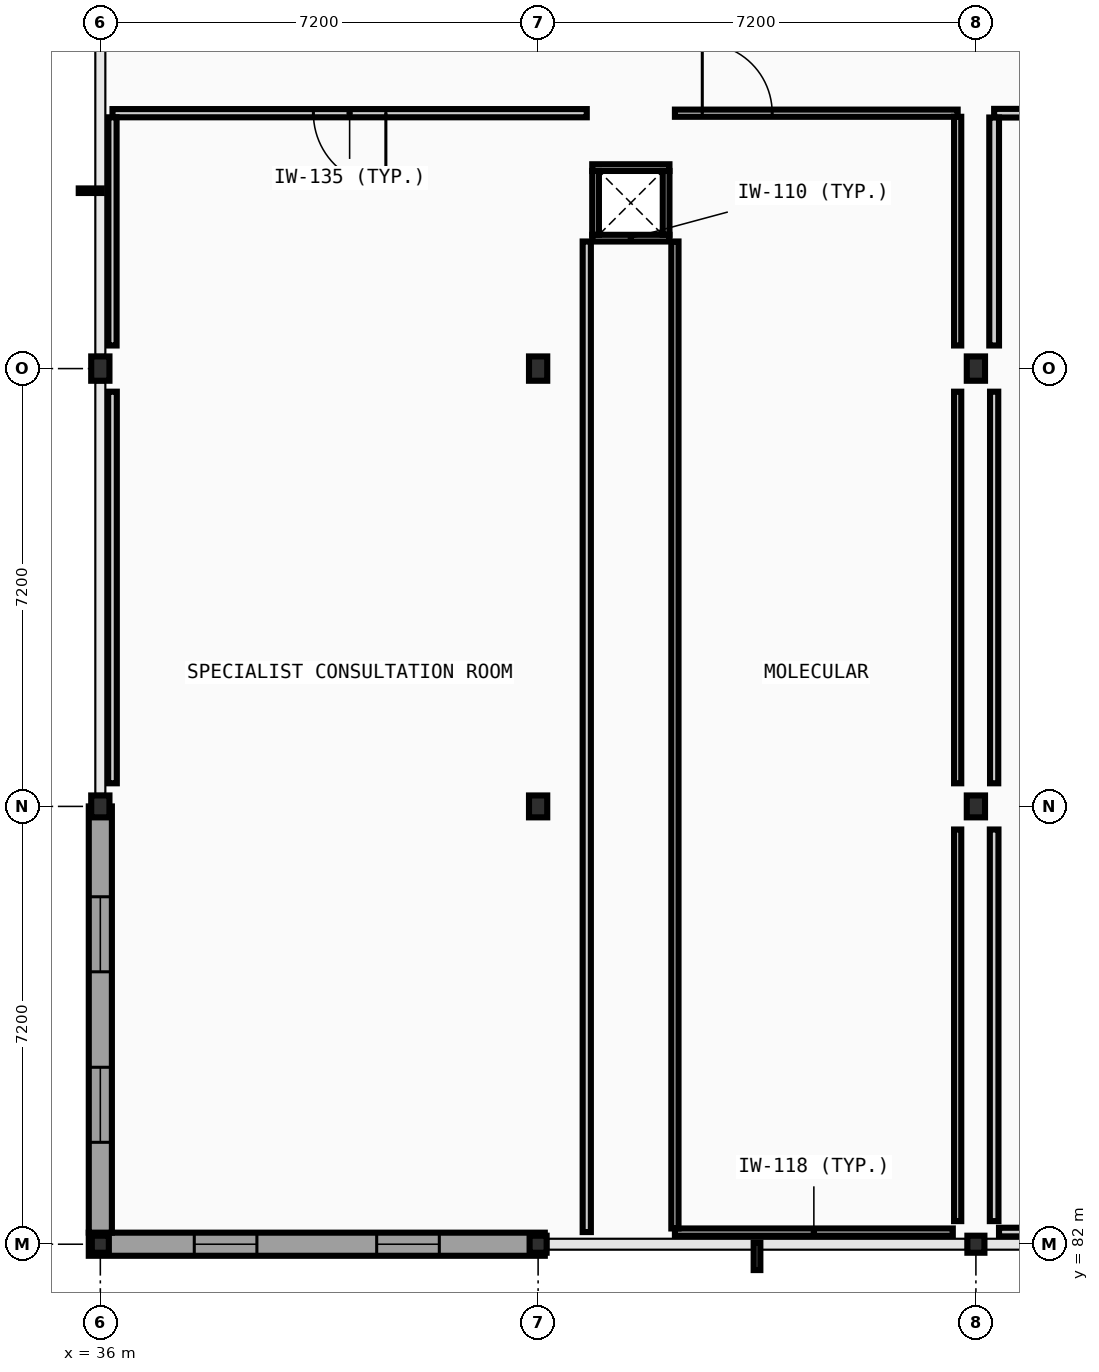
"""IFC4 building model, lengths in metres.
Left out: names, types, materials, properties, quantities, classifications, styles, units other than length and angle.
Written with IfcOpenShell. Run it as: python <this file> out.ifc"""

import sys

from ifc_helpers import new_model, si_unit, direction, frame, frame_2d, origin, origin_2d, place, context, subcontext, project, spatial, rectangle, i_section, extrude, element, fill, save


model = new_model("IFC4")
c1 = context("Model", 3, precision=1e-05, world=origin(), true_north=direction((0.0, 1.0)))
c2 = subcontext(c1, "Body", "Model", "MODEL_VIEW")
j1 = project(units=[si_unit("LENGTHUNIT", "METRE"), si_unit("PLANEANGLEUNIT", "RADIAN")], contexts=[c1])
p1 = place(None, origin())
s1 = spatial("IfcSite", under=j1, at=p1, CompositionType="ELEMENT")
p2 = place(p1, origin())
s2 = spatial("IfcBuilding", under=s1, at=p2, CompositionType="ELEMENT")
p3 = place(p2, frame((0.0, 0.0, 9.6)))
s3 = spatial("IfcBuildingStorey", under=s2, at=p3, CompositionType="ELEMENT", Elevation=9.6)
p4 = place(p3, frame((36.0, 82.0, 0.0), z_axis=(0.0, 0.0, 1.0), x_axis=(1.0, 0.0, 0.0)))
e1 = element("IfcColumn", 1, at=p4, inside=s3, PredefinedType="COLUMN", context=c2, shape_type="SweptSolid", body=[
    extrude(i_section(OverallWidth=0.28, OverallDepth=0.28, WebThickness=0.01, FlangeThickness=0.018, FilletRadius=0.024, at=origin_2d()), origin(), (0.0, 0.0, 1.0), 4.4),
])
p5 = place(p3, frame((36.0, 89.2, 0.0), z_axis=(0.0, 0.0, 1.0), x_axis=(1.0, 0.0, 0.0)))
e2 = element("IfcColumn", 2, at=p5, inside=s3, PredefinedType="COLUMN", context=c2, shape_type="SweptSolid", body=[
    extrude(i_section(OverallWidth=0.3, OverallDepth=0.36, WebThickness=0.012, FlangeThickness=0.022, FilletRadius=0.027, at=origin_2d()), origin(), (0.0, 0.0, 1.0), 4.4),
])
p6 = place(p3, frame((36.0, 96.4, 0.0), z_axis=(0.0, 0.0, 1.0), x_axis=(1.0, 0.0, 0.0)))
e3 = element("IfcColumn", 3, at=p6, inside=s3, PredefinedType="COLUMN", context=c2, shape_type="SweptSolid", body=[
    extrude(i_section(OverallWidth=0.3, OverallDepth=0.4, WebThickness=0.013, FlangeThickness=0.024, FilletRadius=0.027, at=origin_2d()), origin(), (0.0, 0.0, 1.0), 4.4),
])
p7 = place(p3, frame((43.2, 82.0, 0.0), z_axis=(0.0, 0.0, 1.0), x_axis=(1.0, 0.0, 0.0)))
e4 = element("IfcColumn", 4, at=p7, inside=s3, PredefinedType="COLUMN", context=c2, shape_type="SweptSolid", body=[
    extrude(i_section(OverallWidth=0.28, OverallDepth=0.28, WebThickness=0.01, FlangeThickness=0.018, FilletRadius=0.024, at=origin_2d()), origin(), (0.0, 0.0, 1.0), 4.4),
])
p8 = place(p3, frame((43.2, 89.2, 0.0), z_axis=(0.0, 0.0, 1.0), x_axis=(1.0, 0.0, 0.0)))
e5 = element("IfcColumn", 5, at=p8, inside=s3, PredefinedType="COLUMN", context=c2, shape_type="SweptSolid", body=[
    extrude(i_section(OverallWidth=0.3, OverallDepth=0.36, WebThickness=0.012, FlangeThickness=0.022, FilletRadius=0.027, at=origin_2d()), origin(), (0.0, 0.0, 1.0), 4.4),
])
p9 = place(p3, frame((43.2, 96.4, 0.0), z_axis=(0.0, 0.0, 1.0), x_axis=(1.0, 0.0, 0.0)))
e6 = element("IfcColumn", 6, at=p9, inside=s3, PredefinedType="COLUMN", context=c2, shape_type="SweptSolid", body=[
    extrude(i_section(OverallWidth=0.3, OverallDepth=0.4, WebThickness=0.013, FlangeThickness=0.024, FilletRadius=0.027, at=origin_2d()), origin(), (0.0, 0.0, 1.0), 4.4),
])
p10 = place(p3, frame((50.4, 82.0, 0.0), z_axis=(0.0, 0.0, 1.0), x_axis=(1.0, 0.0, 0.0)))
e7 = element("IfcColumn", 7, at=p10, inside=s3, PredefinedType="COLUMN", context=c2, shape_type="SweptSolid", body=[
    extrude(i_section(OverallWidth=0.28, OverallDepth=0.28, WebThickness=0.01, FlangeThickness=0.018, FilletRadius=0.024, at=origin_2d()), origin(), (0.0, 0.0, 1.0), 4.4),
])
p11 = place(p3, frame((50.4, 89.2, 0.0), z_axis=(0.0, 0.0, 1.0), x_axis=(1.0, 0.0, 0.0)))
e8 = element("IfcColumn", 8, at=p11, inside=s3, PredefinedType="COLUMN", context=c2, shape_type="SweptSolid", body=[
    extrude(i_section(OverallWidth=0.3, OverallDepth=0.36, WebThickness=0.012, FlangeThickness=0.022, FilletRadius=0.027, at=origin_2d()), origin(), (0.0, 0.0, 1.0), 4.4),
])
p12 = place(p3, frame((50.4, 96.4, 0.0), z_axis=(0.0, 0.0, 1.0), x_axis=(1.0, 0.0, 0.0)))
e9 = element("IfcColumn", 9, at=p12, inside=s3, PredefinedType="COLUMN", context=c2, shape_type="SweptSolid", body=[
    extrude(i_section(OverallWidth=0.3, OverallDepth=0.4, WebThickness=0.013, FlangeThickness=0.024, FilletRadius=0.027, at=origin_2d()), origin(), (0.0, 0.0, 1.0), 4.4),
])
p13 = place(p3, frame((35.81, 82.0, 0.0), z_axis=(0.0, 0.0, 1.0), x_axis=(1.0, 0.0, 0.0)))
e10 = element("IfcWall", 10, at=p13, inside=s3, PredefinedType="STANDARD", context=c2, shape_type="SweptSolid", body=[
    extrude(rectangle(XDim=7.5, YDim=0.38, at=frame_2d((3.75, 0.0))), origin(), (0.0, 0.0, 1.0), 3.9),
])
p14 = place(p13, frame((1.735, 0.0, 0.95)))
e11 = element("IfcOpeningElement", 11, at=p14, cuts=e10, PredefinedType="OPENING", context=c2, shape_type="SweptSolid", body=[
    extrude(rectangle(XDim=1.03, YDim=1.404, at=frame_2d((0.515, 0.702))), frame((0.0, 0.2, 0.0), z_axis=(0.0, -1.0, 0.0), x_axis=(1.0, 0.0, 0.0)), (0.0, 0.0, 1.0), 0.4),
])
p15 = place(p13, frame((4.735, 0.0, 0.95)))
e12 = element("IfcOpeningElement", 12, at=p15, cuts=e10, PredefinedType="OPENING", context=c2, shape_type="SweptSolid", body=[
    extrude(rectangle(XDim=1.03, YDim=1.404, at=frame_2d((0.515, 0.702))), frame((0.0, 0.2, 0.0), z_axis=(0.0, -1.0, 0.0), x_axis=(1.0, 0.0, 0.0)), (0.0, 0.0, 1.0), 0.4),
])
p16 = place(p3, frame((36.0, 89.2, 0.0), z_axis=(0.0, 0.0, 1.0), x_axis=(0.0, -1.0, 0.0)))
e13 = element("IfcWall", 13, at=p16, inside=s3, PredefinedType="STANDARD", context=c2, shape_type="SweptSolid", body=[
    extrude(rectangle(XDim=7.01, YDim=0.38, at=frame_2d((3.505, 0.0))), origin(), (0.0, 0.0, 1.0), 3.89),
])
p17 = place(p16, frame((1.486, 0.0, 0.95)))
e14 = element("IfcOpeningElement", 14, at=p17, cuts=e13, PredefinedType="OPENING", context=c2, shape_type="SweptSolid", body=[
    extrude(rectangle(XDim=1.234, YDim=1.404, at=frame_2d((0.617, 0.702))), frame((0.0, 0.2, 0.0), z_axis=(0.0, -1.0, 0.0), x_axis=(1.0, 0.0, 0.0)), (0.0, 0.0, 1.0), 0.4),
])
p18 = place(p16, frame((4.29, 0.0, 0.95)))
e15 = element("IfcOpeningElement", 15, at=p18, cuts=e13, PredefinedType="OPENING", context=c2, shape_type="SweptSolid", body=[
    extrude(rectangle(XDim=1.234, YDim=1.404, at=frame_2d((0.617, 0.702))), frame((0.0, 0.2, 0.0), z_axis=(0.0, -1.0, 0.0), x_axis=(1.0, 0.0, 0.0)), (0.0, 0.0, 1.0), 0.4),
])
for number, where, z_axis, x_axis in (
    (16, (44.09, 98.545, 0.0), (0.0, 0.0, 1.0), (1.0, 0.0, 0.0)),
    (17, (44.09, 99.705, 0.0), (0.0, 0.0, 1.0), (1.0, 0.0, 0.0)),
):
    element("IfcWall", number, at=place(p3, frame(where, z_axis=z_axis, x_axis=x_axis)), inside=s3, PredefinedType="PARTITIONING", context=c2, shape_type="SweptSolid", body=[
        extrude(rectangle(XDim=1.27, YDim=0.11, at=frame_2d((0.635, 0.0))), origin(), (0.0, 0.0, 1.0), 4.2),
    ])
for number, where, z_axis, x_axis in (
    (18, (44.145, 98.6, 0.0), (0.0, 0.0, 1.0), (0.0, 1.0, 0.0)),
    (19, (45.305, 98.6, 0.0), (0.0, 0.0, 1.0), (0.0, 1.0, 0.0)),
):
    element("IfcWall", number, at=place(p3, frame(where, z_axis=z_axis, x_axis=x_axis)), inside=s3, PredefinedType="PARTITIONING", context=c2, shape_type="SweptSolid", body=[
        extrude(rectangle(XDim=1.05, YDim=0.11, at=frame_2d((0.525, 0.0))), origin(), (0.0, 0.0, 1.0), 4.2),
    ])
p19 = place(p3, frame((45.45, 82.2, 0.0), z_axis=(0.0, 0.0, 1.0), x_axis=(1.0, 0.0, 0.0)))
e20 = element("IfcWall", 20, at=p19, inside=s3, PredefinedType="PARTITIONING", context=c2, shape_type="SweptSolid", body=[
    extrude(rectangle(XDim=4.57, YDim=0.118, at=frame_2d((2.285, 0.0))), origin(), (0.0, 0.0, 1.0), 3.9),
])
p20 = place(p3, frame((50.78, 82.2, 0.0), z_axis=(0.0, 0.0, 1.0), x_axis=(1.0, 0.0, 0.0)))
e21 = element("IfcWall", 21, at=p20, inside=s3, PredefinedType="PARTITIONING", context=c2, shape_type="SweptSolid", body=[
    extrude(rectangle(XDim=6.44, YDim=0.142, at=frame_2d((3.22, 0.0))), origin(), (0.0, 0.0, 1.0), 3.9),
])
p21 = place(p3, frame((36.2, 100.6, 0.0), z_axis=(0.0, 0.0, 1.0), x_axis=(1.0, 0.0, 0.0)))
e22 = element("IfcWall", 22, at=p21, inside=s3, PredefinedType="PARTITIONING", context=c2, shape_type="SweptSolid", body=[
    extrude(rectangle(XDim=7.8, YDim=0.135, at=frame_2d((3.9, 0.0))), origin(), (0.0, 0.0, 1.0), 4.2),
])
p22 = place(p21, frame((3.304, 0.0, 0.0)))
e23 = element("IfcOpeningElement", 23, at=p22, cuts=e22, PredefinedType="OPENING", context=c2, shape_type="SweptSolid", body=[
    extrude(rectangle(XDim=1.192, YDim=2.152, at=frame_2d((0.596, 1.076))), frame((0.0, 0.078, 0.0), z_axis=(0.0, -1.0, 0.0), x_axis=(1.0, 0.0, 0.0)), (0.0, 0.0, 1.0), 0.155),
])
p23 = place(p3, frame((45.45, 100.6, 0.0), z_axis=(0.0, 0.0, 1.0), x_axis=(1.0, 0.0, 0.0)))
e24 = element("IfcWall", 24, at=p23, inside=s3, PredefinedType="PARTITIONING", context=c2, shape_type="SweptSolid", body=[
    extrude(rectangle(XDim=4.65, YDim=0.118, at=frame_2d((2.325, 0.0))), origin(), (0.0, 0.0, 1.0), 4.2),
])
p24 = place(p23, frame((0.45, 0.0, 0.0)))
e25 = element("IfcOpeningElement", 25, at=p24, cuts=e24, PredefinedType="OPENING", context=c2, shape_type="SweptSolid", body=[
    extrude(rectangle(XDim=1.15, YDim=2.15, at=frame_2d((0.575, 1.075))), frame((0.0, 0.069, 0.0), z_axis=(0.0, -1.0, 0.0), x_axis=(1.0, 0.0, 0.0)), (0.0, 0.0, 1.0), 0.138),
])
p25 = place(p3, frame((50.7, 100.6, 0.0), z_axis=(0.0, 0.0, 1.0), x_axis=(1.0, 0.0, 0.0)))
e26 = element("IfcWall", 26, at=p25, inside=s3, PredefinedType="PARTITIONING", context=c2, shape_type="SweptSolid", body=[
    extrude(rectangle(XDim=13.9, YDim=0.142, at=frame_2d((6.95, 0.0))), origin(), (0.0, 0.0, 1.0), 4.2),
])
p26 = place(p25, frame((2.267, 0.0, 0.0)))
e27 = element("IfcOpeningElement", 27, at=p26, cuts=e26, PredefinedType="OPENING", context=c2, shape_type="SweptSolid", body=[
    extrude(rectangle(XDim=1.166, YDim=2.152, at=frame_2d((0.583, 1.076))), frame((0.0, 0.081, 0.0), z_axis=(0.0, -1.0, 0.0), x_axis=(1.0, 0.0, 0.0)), (0.0, 0.0, 1.0), 0.162),
])
p27 = place(p25, frame((9.36, 0.0, 0.0)))
e28 = element("IfcOpeningElement", 28, at=p27, cuts=e26, PredefinedType="OPENING", context=c2, shape_type="SweptSolid", body=[
    extrude(rectangle(XDim=0.88, YDim=2.04, at=frame_2d((0.44, 1.02))), frame((0.0, 0.081, 0.0), z_axis=(0.0, -1.0, 0.0), x_axis=(1.0, 0.0, 0.0)), (0.0, 0.0, 1.0), 0.162),
])
p28 = place(p3, frame((36.2, 89.58, 0.0), z_axis=(0.0, 0.0, 1.0), x_axis=(0.0, 1.0, 0.0)))
e29 = element("IfcWall", 29, at=p28, inside=s3, PredefinedType="PARTITIONING", context=c2, shape_type="SweptSolid", body=[
    extrude(rectangle(XDim=6.44, YDim=0.142, at=frame_2d((3.22, 0.0))), origin(), (0.0, 0.0, 1.0), 3.885),
])
p29 = place(p3, frame((36.2, 96.78, 0.0), z_axis=(0.0, 0.0, 1.0), x_axis=(0.0, 1.0, 0.0)))
e30 = element("IfcWall", 30, at=p29, inside=s3, PredefinedType="PARTITIONING", context=c2, shape_type="SweptSolid", body=[
    extrude(rectangle(XDim=3.752, YDim=0.135, at=frame_2d((1.876, 0.0))), origin(), (0.0, 0.0, 1.0), 3.885),
])
p30 = place(p3, frame((44.0, 82.2, 0.0), z_axis=(0.0, 0.0, 1.0), x_axis=(0.0, 1.0, 0.0)))
e31 = element("IfcWall", 31, at=p30, inside=s3, PredefinedType="PARTITIONING", context=c2, shape_type="SweptSolid", body=[
    extrude(rectangle(XDim=16.29, YDim=0.135, at=frame_2d((8.145, 0.0))), origin(), (0.0, 0.0, 1.0), 4.2),
])
p31 = place(p3, frame((45.45, 82.259, 0.0), z_axis=(0.0, 0.0, 1.0), x_axis=(0.0, 1.0, 0.0)))
e32 = element("IfcWall", 32, at=p31, inside=s3, PredefinedType="PARTITIONING", context=c2, shape_type="SweptSolid", body=[
    extrude(rectangle(XDim=16.231, YDim=0.118, at=frame_2d((8.115, 0.0))), origin(), (0.0, 0.0, 1.0), 3.915),
])
p32 = place(p3, frame((50.1, 82.38, 0.0), z_axis=(0.0, 0.0, 1.0), x_axis=(0.0, 1.0, 0.0)))
e33 = element("IfcWall", 33, at=p32, inside=s3, PredefinedType="PARTITIONING", context=c2, shape_type="SweptSolid", body=[
    extrude(rectangle(XDim=6.44, YDim=0.118, at=frame_2d((3.22, 0.0))), origin(), (0.0, 0.0, 1.0), 4.2),
])
p33 = place(p3, frame((50.1, 89.58, 0.0), z_axis=(0.0, 0.0, 1.0), x_axis=(0.0, 1.0, 0.0)))
e34 = element("IfcWall", 34, at=p33, inside=s3, PredefinedType="PARTITIONING", context=c2, shape_type="SweptSolid", body=[
    extrude(rectangle(XDim=6.44, YDim=0.118, at=frame_2d((3.22, 0.0))), origin(), (0.0, 0.0, 1.0), 4.2),
])
p34 = place(p3, frame((50.1, 96.78, 0.0), z_axis=(0.0, 0.0, 1.0), x_axis=(0.0, 1.0, 0.0)))
e35 = element("IfcWall", 35, at=p34, inside=s3, PredefinedType="PARTITIONING", context=c2, shape_type="SweptSolid", body=[
    extrude(rectangle(XDim=3.761, YDim=0.118, at=frame_2d((1.88, 0.0))), origin(), (0.0, 0.0, 1.0), 4.2),
])
p35 = place(p3, frame((50.7, 82.38, 0.0), z_axis=(0.0, 0.0, 1.0), x_axis=(0.0, 1.0, 0.0)))
e36 = element("IfcWall", 36, at=p35, inside=s3, PredefinedType="PARTITIONING", context=c2, shape_type="SweptSolid", body=[
    extrude(rectangle(XDim=6.44, YDim=0.142, at=frame_2d((3.22, 0.0))), origin(), (0.0, 0.0, 1.0), 3.9),
])
p36 = place(p3, frame((50.7, 89.58, 0.0), z_axis=(0.0, 0.0, 1.0), x_axis=(0.0, 1.0, 0.0)))
e37 = element("IfcWall", 37, at=p36, inside=s3, PredefinedType="PARTITIONING", context=c2, shape_type="SweptSolid", body=[
    extrude(rectangle(XDim=6.44, YDim=0.135, at=frame_2d((3.22, 0.0))), origin(), (0.0, 0.0, 1.0), 4.2),
])
p37 = place(p3, frame((50.7, 96.78, 0.0), z_axis=(0.0, 0.0, 1.0), x_axis=(0.0, 1.0, 0.0)))
e38 = element("IfcWall", 38, at=p37, inside=s3, PredefinedType="PARTITIONING", context=c2, shape_type="SweptSolid", body=[
    extrude(rectangle(XDim=3.749, YDim=0.16, at=frame_2d((1.875, 0.0))), origin(), (0.0, 0.0, 1.0), 3.895),
])
p38 = place(p14, origin())
e39 = element("IfcWindow", 39, at=p38, inside=s3, PartitioningType="SINGLE_PANEL", PredefinedType="WINDOW", context=c2, shape_type="SweptSolid", body=[
    extrude(rectangle(XDim=1.03, YDim=1.404, at=frame_2d((0.515, 0.702))), frame((0.0, 0.03, 0.0), z_axis=(0.0, -1.0, 0.0), x_axis=(1.0, 0.0, 0.0)), (0.0, 0.0, 1.0), 0.06),
])
fill(e11, e39)
p39 = place(p15, origin())
e40 = element("IfcWindow", 40, at=p39, inside=s3, PartitioningType="SINGLE_PANEL", PredefinedType="WINDOW", context=c2, shape_type="SweptSolid", body=[
    extrude(rectangle(XDim=1.03, YDim=1.404, at=frame_2d((0.515, 0.702))), frame((0.0, 0.03, 0.0), z_axis=(0.0, -1.0, 0.0), x_axis=(1.0, 0.0, 0.0)), (0.0, 0.0, 1.0), 0.06),
])
fill(e12, e40)
p40 = place(p17, origin())
e41 = element("IfcWindow", 41, at=p40, inside=s3, PartitioningType="SINGLE_PANEL", PredefinedType="WINDOW", context=c2, shape_type="SweptSolid", body=[
    extrude(rectangle(XDim=1.234, YDim=1.404, at=frame_2d((0.617, 0.702))), frame((0.0, 0.03, 0.0), z_axis=(0.0, -1.0, 0.0), x_axis=(1.0, 0.0, 0.0)), (0.0, 0.0, 1.0), 0.06),
])
fill(e14, e41)
p41 = place(p18, origin())
e42 = element("IfcWindow", 42, at=p41, inside=s3, PartitioningType="SINGLE_PANEL", PredefinedType="WINDOW", context=c2, shape_type="SweptSolid", body=[
    extrude(rectangle(XDim=1.234, YDim=1.404, at=frame_2d((0.617, 0.702))), frame((0.0, 0.03, 0.0), z_axis=(0.0, -1.0, 0.0), x_axis=(1.0, 0.0, 0.0)), (0.0, 0.0, 1.0), 0.06),
])
fill(e15, e42)
p42 = place(p24, origin())
e43 = element("IfcDoor", 43, at=p42, inside=s3, OperationType="SINGLE_SWING_LEFT", PredefinedType="DOOR", context=c2, shape_type="SweptSolid", body=[
    extrude(rectangle(XDim=1.15, YDim=2.15, at=frame_2d((0.575, 1.075))), frame((0.0, 0.025, 0.0), z_axis=(0.0, -1.0, 0.0), x_axis=(1.0, 0.0, 0.0)), (0.0, 0.0, 1.0), 0.05),
])
fill(e25, e43)
p43 = place(p22, origin())
e44 = element("IfcDoor", 44, at=p43, inside=s3, OperationType="SINGLE_SWING_RIGHT", PredefinedType="DOOR", context=c2, shape_type="SweptSolid", body=[
    extrude(rectangle(XDim=1.192, YDim=2.152, at=frame_2d((0.596, 1.076))), frame((0.0, 0.025, 0.0), z_axis=(0.0, -1.0, 0.0), x_axis=(1.0, 0.0, 0.0)), (0.0, 0.0, 1.0), 0.05),
])
fill(e23, e44)
save(model, sys.argv[1])
